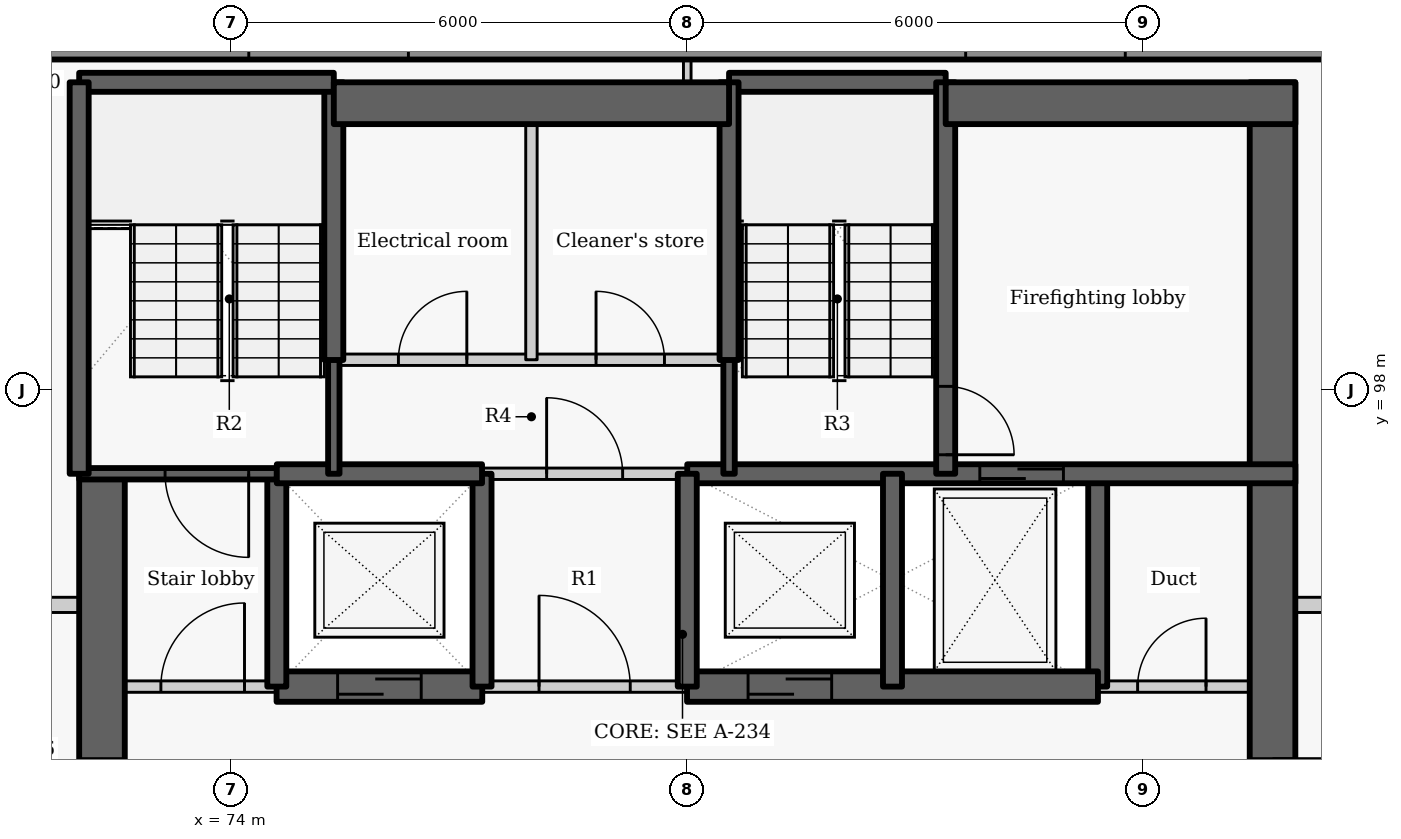
"""IFC4 building model, lengths in metres.
Left out: names, types, materials, properties, quantities, classifications, styles, units other than length and angle.
Written with IfcOpenShell. Run it as: python <this file> out.ifc"""

import sys

from ifc_helpers import new_model, si_unit, direction, frame, frame_2d, origin, place, context, subcontext, project, spatial, rectangle, extrude, element, fill, save


model = new_model("IFC4")
c1 = context("Model", 3, precision=1e-05, world=origin(), true_north=direction((0.0, 1.0)))
c2 = subcontext(c1, "Body", "Model", "MODEL_VIEW")
j1 = project(units=[si_unit("LENGTHUNIT", "METRE"), si_unit("PLANEANGLEUNIT", "RADIAN")], contexts=[c1])
p1 = place(None, origin())
s1 = spatial("IfcSite", under=j1, at=p1, CompositionType="ELEMENT")
p2 = place(p1, origin())
s2 = spatial("IfcBuilding", under=s1, at=p2, CompositionType="ELEMENT")
p3 = place(p2, frame((0.0, 0.0, 193.2)))
s3 = spatial("IfcBuildingStorey", under=s2, at=p3, CompositionType="ELEMENT", Elevation=193.2)
p4 = place(p3, frame((89.449, 102.5, 0.0), z_axis=(0.0, 0.0, 1.0), x_axis=(-1.0, 0.0, 0.0)))
e1 = element("IfcWall", 1, at=p4, inside=s3, PredefinedType="SOLIDWALL", context=c2, shape_type="SweptSolid", body=[
    extrude(rectangle(XDim=18.933, YDim=0.3, at=frame_2d((9.466, 0.0))), origin(), (0.0, 0.0, 1.0), 2.425),
])
p5 = place(p4, frame((3.687, 0.0, 0.9)))
e2 = element("IfcOpeningElement", 2, at=p5, cuts=e1, PredefinedType="OPENING", context=c2, shape_type="SweptSolid", body=[
    extrude(rectangle(XDim=2.1, YDim=1.1, at=frame_2d((1.05, 0.55))), frame((0.0, 0.16, 0.0), z_axis=(0.0, -1.0, 0.0), x_axis=(1.0, 0.0, 0.0)), (0.0, 0.0, 1.0), 0.32),
])
p6 = place(p4, frame((13.118, 0.0, 0.9)))
e3 = element("IfcOpeningElement", 3, at=p6, cuts=e1, PredefinedType="OPENING", context=c2, shape_type="SweptSolid", body=[
    extrude(rectangle(XDim=2.1, YDim=1.1, at=frame_2d((1.05, 0.55))), frame((0.0, 0.16, 0.0), z_axis=(0.0, -1.0, 0.0), x_axis=(1.0, 0.0, 0.0)), (0.0, 0.0, 1.0), 0.32),
])
p7 = place(p3, frame((72.3, 87.8, -0.275), z_axis=(0.0, 0.0, 1.0), x_axis=(0.0, 1.0, 0.0)))
e4 = element("IfcWall", 4, at=p7, inside=s3, PredefinedType="SHEAR", context=c2, shape_type="SweptSolid", body=[
    extrude(rectangle(XDim=9.1, YDim=0.6, at=frame_2d((4.55, 0.0))), origin(), (0.0, 0.0, 1.0), 3.3),
])
p8 = place(p7, frame((3.852, 0.0, 0.275)))
e5 = element("IfcOpeningElement", 5, at=p8, cuts=e4, PredefinedType="OPENING", context=c2, shape_type="SweptSolid", body=[
    extrude(rectangle(XDim=1.5, YDim=2.1, at=frame_2d((0.75, 1.05))), frame((0.0, 0.31, 0.0), z_axis=(0.0, -1.0, 0.0), x_axis=(1.0, 0.0, 0.0)), (0.0, 0.0, 1.0), 0.62),
])
p9 = place(p3, frame((85.4, 94.1, -0.275), z_axis=(0.0, 0.0, 1.0), x_axis=(0.0, 1.0, 0.0)))
e6 = element("IfcWall", 6, at=p9, inside=s3, PredefinedType="SHEAR", context=c2, shape_type="SweptSolid", body=[
    extrude(rectangle(XDim=2.8, YDim=0.25, at=frame_2d((1.4, 0.0))), origin(), (0.0, 0.0, 1.0), 3.3),
])
p10 = place(p3, frame((87.7, 102.05, -0.275), z_axis=(0.0, 0.0, 1.0), x_axis=(0.0, -1.0, 0.0)))
e7 = element("IfcWall", 7, at=p10, inside=s3, PredefinedType="SHEAR", context=c2, shape_type="SweptSolid", body=[
    extrude(rectangle(XDim=14.25, YDim=0.6, at=frame_2d((7.125, 0.0))), origin(), (0.0, 0.0, 1.0), 3.3),
])
p11 = place(p10, frame((8.898, 0.0, 0.275)))
e8 = element("IfcOpeningElement", 8, at=p11, cuts=e7, PredefinedType="OPENING", context=c2, shape_type="SweptSolid", body=[
    extrude(rectangle(XDim=1.5, YDim=2.1, at=frame_2d((0.75, 1.05))), frame((0.0, 0.31, 0.0), z_axis=(0.0, -1.0, 0.0), x_axis=(1.0, 0.0, 0.0)), (0.0, 0.0, 1.0), 0.62),
])
p12 = place(p3, frame((72.0, 94.1, 0.0), z_axis=(0.0, 0.0, 1.0), x_axis=(1.0, 0.0, 0.0)))
e9 = element("IfcWall", 9, at=p12, inside=s3, PredefinedType="PARTITIONING", context=c2, shape_type="SweptSolid", body=[
    extrude(rectangle(XDim=2.603, YDim=0.15, at=frame_2d((1.302, 0.0))), origin(), (0.0, 0.0, 1.0), 3.025),
])
p13 = place(p12, frame((1.075, 0.0, 0.0)))
e10 = element("IfcOpeningElement", 10, at=p13, cuts=e9, PredefinedType="OPENING", context=c2, shape_type="SweptSolid", body=[
    extrude(rectangle(XDim=1.1, YDim=2.1, at=frame_2d((0.55, 1.05))), frame((0.0, 0.085, 0.0), z_axis=(0.0, -1.0, 0.0), x_axis=(1.0, 0.0, 0.0)), (0.0, 0.0, 1.0), 0.17),
])
p14 = place(p3, frame((77.297, 94.1, 0.0), z_axis=(0.0, 0.0, 1.0), x_axis=(1.0, 0.0, 0.0)))
e11 = element("IfcWall", 11, at=p14, inside=s3, PredefinedType="PARTITIONING", context=c2, shape_type="SweptSolid", body=[
    extrude(rectangle(XDim=2.706, YDim=0.15, at=frame_2d((1.353, 0.0))), origin(), (0.0, 0.0, 1.0), 3.025),
])
p15 = place(p14, frame((0.753, 0.0, 0.0)))
e12 = element("IfcOpeningElement", 12, at=p15, cuts=e11, PredefinedType="OPENING", context=c2, shape_type="SweptSolid", body=[
    extrude(rectangle(XDim=1.2, YDim=2.1, at=frame_2d((0.6, 1.05))), frame((0.0, 0.085, 0.0), z_axis=(0.0, -1.0, 0.0), x_axis=(1.0, 0.0, 0.0)), (0.0, 0.0, 1.0), 0.17),
])
p16 = place(p3, frame((85.397, 94.1, 0.0), z_axis=(0.0, 0.0, 1.0), x_axis=(1.0, 0.0, 0.0)))
e13 = element("IfcWall", 13, at=p16, inside=s3, PredefinedType="PARTITIONING", context=c2, shape_type="SweptSolid", body=[
    extrude(rectangle(XDim=2.603, YDim=0.15, at=frame_2d((1.302, 0.0))), origin(), (0.0, 0.0, 1.0), 3.025),
])
p17 = place(p16, frame((0.528, 0.0, 0.0)))
e14 = element("IfcOpeningElement", 14, at=p17, cuts=e13, PredefinedType="OPENING", context=c2, shape_type="SweptSolid", body=[
    extrude(rectangle(XDim=0.9, YDim=2.1, at=frame_2d((0.45, 1.05))), frame((0.0, 0.085, 0.0), z_axis=(0.0, -1.0, 0.0), x_axis=(1.0, 0.0, 0.0)), (0.0, 0.0, 1.0), 0.17),
])
p18 = place(p3, frame((74.597, 94.1, -0.275), z_axis=(0.0, 0.0, 1.0), x_axis=(1.0, 0.0, 0.0)))
e15 = element("IfcWall", 15, at=p18, inside=s3, PredefinedType="SHEAR", context=c2, shape_type="SweptSolid", body=[
    extrude(rectangle(XDim=2.706, YDim=0.4, at=frame_2d((1.353, 0.0))), origin(), (0.0, 0.0, 1.0), 3.3),
])
p19 = place(p18, frame((0.803, 0.0, 0.275)))
e16 = element("IfcOpeningElement", 16, at=p19, cuts=e15, PredefinedType="OPENING", context=c2, shape_type="SweptSolid", body=[
    extrude(rectangle(XDim=1.1, YDim=2.1, at=frame_2d((0.55, 1.05))), frame((0.0, 0.21, 0.0), z_axis=(0.0, -1.0, 0.0), x_axis=(1.0, 0.0, 0.0)), (0.0, 0.0, 1.0), 0.42),
])
p20 = place(p3, frame((79.997, 94.1, -0.275), z_axis=(0.0, 0.0, 1.0), x_axis=(1.0, 0.0, 0.0)))
e17 = element("IfcWall", 17, at=p20, inside=s3, PredefinedType="SHEAR", context=c2, shape_type="SweptSolid", body=[
    extrude(rectangle(XDim=5.406, YDim=0.4, at=frame_2d((2.703, 0.0))), origin(), (0.0, 0.0, 1.0), 3.3),
])
p21 = place(p20, frame((0.803, 0.0, 0.275)))
e18 = element("IfcOpeningElement", 18, at=p21, cuts=e17, PredefinedType="OPENING", context=c2, shape_type="SweptSolid", body=[
    extrude(rectangle(XDim=1.1, YDim=2.1, at=frame_2d((0.55, 1.05))), frame((0.0, 0.21, 0.0), z_axis=(0.0, -1.0, 0.0), x_axis=(1.0, 0.0, 0.0)), (0.0, 0.0, 1.0), 0.42),
])
p22 = place(p3, frame((74.6, 94.1, -0.275), z_axis=(0.0, 0.0, 1.0), x_axis=(0.0, 1.0, 0.0)))
e19 = element("IfcWall", 19, at=p22, inside=s3, PredefinedType="SHEAR", context=c2, shape_type="SweptSolid", body=[
    extrude(rectangle(XDim=2.8, YDim=0.25, at=frame_2d((1.4, 0.0))), origin(), (0.0, 0.0, 1.0), 3.3),
])
p23 = place(p3, frame((74.6, 96.9, -0.275), z_axis=(0.0, 0.0, 1.0), x_axis=(-1.0, 0.0, 0.0)))
e20 = element("IfcWall", 20, at=p23, inside=s3, PredefinedType="SHEAR", context=c2, shape_type="SweptSolid", body=[
    extrude(rectangle(XDim=2.6, YDim=0.15, at=frame_2d((1.3, 0.0))), origin(), (0.0, 0.0, 1.0), 3.3),
])
p24 = place(p23, frame((0.37, 0.0, 0.275)))
e21 = element("IfcOpeningElement", 21, at=p24, cuts=e20, PredefinedType="OPENING", context=c2, shape_type="SweptSolid", body=[
    extrude(rectangle(XDim=1.1, YDim=2.1, at=frame_2d((0.55, 1.05))), frame((0.0, 0.085, 0.0), z_axis=(0.0, -1.0, 0.0), x_axis=(1.0, 0.0, 0.0)), (0.0, 0.0, 1.0), 0.17),
])
p25 = place(p3, frame((77.3, 94.1, -0.275), z_axis=(0.0, 0.0, 1.0), x_axis=(0.0, 1.0, 0.0)))
e22 = element("IfcWall", 22, at=p25, inside=s3, PredefinedType="SHEAR", context=c2, shape_type="SweptSolid", body=[
    extrude(rectangle(XDim=2.8, YDim=0.25, at=frame_2d((1.4, 0.0))), origin(), (0.0, 0.0, 1.0), 3.3),
])
p26 = place(p3, frame((74.6, 96.9, -0.275), z_axis=(0.0, 0.0, 1.0), x_axis=(1.0, 0.0, 0.0)))
e23 = element("IfcWall", 23, at=p26, inside=s3, PredefinedType="SHEAR", context=c2, shape_type="SweptSolid", body=[
    extrude(rectangle(XDim=2.7, YDim=0.25, at=frame_2d((1.35, 0.0))), origin(), (0.0, 0.0, 1.0), 3.3),
])
p27 = place(p3, frame((80.0, 96.9, -0.275), z_axis=(0.0, 0.0, 1.0), x_axis=(1.0, 0.0, 0.0)))
e24 = element("IfcWall", 24, at=p27, inside=s3, PredefinedType="SHEAR", context=c2, shape_type="SweptSolid", body=[
    extrude(rectangle(XDim=8.0, YDim=0.25, at=frame_2d((4.0, 0.0))), origin(), (0.0, 0.0, 1.0), 3.3),
])
p28 = place(p27, frame((3.849, 0.0, 0.275)))
e25 = element("IfcOpeningElement", 25, at=p28, cuts=e24, PredefinedType="OPENING", context=c2, shape_type="SweptSolid", body=[
    extrude(rectangle(XDim=1.1, YDim=2.1, at=frame_2d((0.55, 1.05))), frame((0.0, 0.135, 0.0), z_axis=(0.0, -1.0, 0.0), x_axis=(1.0, 0.0, 0.0)), (0.0, 0.0, 1.0), 0.27),
])
p29 = place(p3, frame((80.0, 94.1, -0.275), z_axis=(0.0, 0.0, 1.0), x_axis=(0.0, 1.0, 0.0)))
e26 = element("IfcWall", 26, at=p29, inside=s3, PredefinedType="SHEAR", context=c2, shape_type="SweptSolid", body=[
    extrude(rectangle(XDim=2.8, YDim=0.25, at=frame_2d((1.4, 0.0))), origin(), (0.0, 0.0, 1.0), 3.3),
])
p30 = place(p3, frame((77.3, 96.9, 0.0), z_axis=(0.0, 0.0, 1.0), x_axis=(1.0, 0.0, 0.0)))
e27 = element("IfcWall", 27, at=p30, inside=s3, PredefinedType="PARTITIONING", context=c2, shape_type="SweptSolid", body=[
    extrude(rectangle(XDim=2.7, YDim=0.15, at=frame_2d((1.35, 0.0))), origin(), (0.0, 0.0, 1.0), 3.025),
])
p31 = place(p30, frame((0.85, 0.0, 0.0)))
e28 = element("IfcOpeningElement", 28, at=p31, cuts=e27, PredefinedType="OPENING", context=c2, shape_type="SweptSolid", body=[
    extrude(rectangle(XDim=1.0, YDim=2.1, at=frame_2d((0.5, 1.05))), frame((0.0, 0.085, 0.0), z_axis=(0.0, -1.0, 0.0), x_axis=(1.0, 0.0, 0.0)), (0.0, 0.0, 1.0), 0.17),
])
p32 = place(p3, frame((82.7, 94.1, -0.275), z_axis=(0.0, 0.0, 1.0), x_axis=(0.0, 1.0, 0.0)))
e29 = element("IfcWall", 29, at=p32, inside=s3, PredefinedType="SHEAR", context=c2, shape_type="SweptSolid", body=[
    extrude(rectangle(XDim=2.8, YDim=0.25, at=frame_2d((1.4, 0.0))), origin(), (0.0, 0.0, 1.0), 3.3),
])
p33 = place(p3, frame((75.35, 96.9, -0.275), z_axis=(0.0, 0.0, 1.0), x_axis=(0.0, 1.0, 0.0)))
e30 = element("IfcWall", 30, at=p33, inside=s3, PredefinedType="SHEAR", context=c2, shape_type="SweptSolid", body=[
    extrude(rectangle(XDim=1.503, YDim=0.15, at=frame_2d((0.751, 0.0))), origin(), (0.0, 0.0, 1.0), 3.3),
])
p34 = place(p3, frame((75.35, 98.397, -0.275), z_axis=(0.0, 0.0, 1.0), x_axis=(0.0, 1.0, 0.0)))
e31 = element("IfcWall", 31, at=p34, inside=s3, PredefinedType="SHEAR", context=c2, shape_type="SweptSolid", body=[
    extrude(rectangle(XDim=3.653, YDim=0.25, at=frame_2d((1.827, 0.0))), origin(), (0.0, 0.0, 1.0), 3.3),
])
p35 = place(p3, frame((72.0, 102.05, -0.275), z_axis=(0.0, 0.0, 1.0), x_axis=(1.0, 0.0, 0.0)))
e32 = element("IfcWall", 32, at=p35, inside=s3, PredefinedType="SHEAR", context=c2, shape_type="SweptSolid", body=[
    extrude(rectangle(XDim=3.35, YDim=0.25, at=frame_2d((1.675, 0.0))), origin(), (0.0, 0.0, 1.0), 3.3),
])
p36 = place(p3, frame((80.55, 102.05, -0.275), z_axis=(0.0, 0.0, 1.0), x_axis=(1.0, 0.0, 0.0)))
e33 = element("IfcWall", 33, at=p36, inside=s3, PredefinedType="SHEAR", context=c2, shape_type="SweptSolid", body=[
    extrude(rectangle(XDim=2.85, YDim=0.25, at=frame_2d((1.425, 0.0))), origin(), (0.0, 0.0, 1.0), 3.3),
])
p37 = place(p3, frame((72.0, 96.9, -0.275), z_axis=(0.0, 0.0, 1.0), x_axis=(0.0, 1.0, 0.0)))
e34 = element("IfcWall", 34, at=p37, inside=s3, PredefinedType="SHEAR", context=c2, shape_type="SweptSolid", body=[
    extrude(rectangle(XDim=5.15, YDim=0.25, at=frame_2d((2.575, 0.0))), origin(), (0.0, 0.0, 1.0), 3.3),
])
p38 = place(p3, frame((83.4, 102.05, -0.275), z_axis=(0.0, 0.0, 1.0), x_axis=(0.0, -1.0, 0.0)))
e35 = element("IfcWall", 35, at=p38, inside=s3, PredefinedType="SHEAR", context=c2, shape_type="SweptSolid", body=[
    extrude(rectangle(XDim=5.15, YDim=0.25, at=frame_2d((2.575, 0.0))), origin(), (0.0, 0.0, 1.0), 3.3),
])
p39 = place(p38, frame((4.0, 0.0, 0.275)))
e36 = element("IfcOpeningElement", 36, at=p39, cuts=e35, PredefinedType="OPENING", context=c2, shape_type="SweptSolid", body=[
    extrude(rectangle(XDim=0.9, YDim=2.1, at=frame_2d((0.45, 1.05))), frame((0.0, 0.135, 0.0), z_axis=(0.0, -1.0, 0.0), x_axis=(1.0, 0.0, 0.0)), (0.0, 0.0, 1.0), 0.27),
])
p40 = place(p3, frame((80.55, 96.9, -0.275), z_axis=(0.0, 0.0, 1.0), x_axis=(0.0, 1.0, 0.0)))
e37 = element("IfcWall", 37, at=p40, inside=s3, PredefinedType="SHEAR", context=c2, shape_type="SweptSolid", body=[
    extrude(rectangle(XDim=1.503, YDim=0.15, at=frame_2d((0.751, 0.0))), origin(), (0.0, 0.0, 1.0), 3.3),
])
p41 = place(p3, frame((80.55, 98.397, -0.275), z_axis=(0.0, 0.0, 1.0), x_axis=(0.0, 1.0, 0.0)))
e38 = element("IfcWall", 38, at=p41, inside=s3, PredefinedType="SHEAR", context=c2, shape_type="SweptSolid", body=[
    extrude(rectangle(XDim=3.653, YDim=0.25, at=frame_2d((1.827, 0.0))), origin(), (0.0, 0.0, 1.0), 3.3),
])
p42 = place(p3, frame((75.35, 101.775, -0.275), z_axis=(0.0, 0.0, 1.0), x_axis=(1.0, 0.0, 0.0)))
e39 = element("IfcWall", 39, at=p42, inside=s3, PredefinedType="SHEAR", context=c2, shape_type="SweptSolid", body=[
    extrude(rectangle(XDim=5.2, YDim=0.55, at=frame_2d((2.6, 0.0))), origin(), (0.0, 0.0, 1.0), 3.3),
])
p43 = place(p3, frame((83.4, 101.775, -0.275), z_axis=(0.0, 0.0, 1.0), x_axis=(1.0, 0.0, 0.0)))
e40 = element("IfcWall", 40, at=p43, inside=s3, PredefinedType="SHEAR", context=c2, shape_type="SweptSolid", body=[
    extrude(rectangle(XDim=4.6, YDim=0.55, at=frame_2d((2.3, 0.0))), origin(), (0.0, 0.0, 1.0), 3.3),
])
p44 = place(p3, frame((75.35, 98.4, 0.0), z_axis=(0.0, 0.0, 1.0), x_axis=(1.0, 0.0, 0.0)))
e41 = element("IfcWall", 41, at=p44, inside=s3, PredefinedType="PARTITIONING", context=c2, shape_type="SweptSolid", body=[
    extrude(rectangle(XDim=5.2, YDim=0.15, at=frame_2d((2.6, 0.0))), origin(), (0.0, 0.0, 1.0), 3.025),
])
p45 = place(p44, frame((0.85, 0.0, 0.0)))
e42 = element("IfcOpeningElement", 42, at=p45, cuts=e41, PredefinedType="OPENING", context=c2, shape_type="SweptSolid", body=[
    extrude(rectangle(XDim=0.9, YDim=2.1, at=frame_2d((0.45, 1.05))), frame((0.0, 0.085, 0.0), z_axis=(0.0, -1.0, 0.0), x_axis=(1.0, 0.0, 0.0)), (0.0, 0.0, 1.0), 0.17),
])
p46 = place(p44, frame((3.45, 0.0, 0.0)))
e43 = element("IfcOpeningElement", 43, at=p46, cuts=e41, PredefinedType="OPENING", context=c2, shape_type="SweptSolid", body=[
    extrude(rectangle(XDim=0.9, YDim=2.1, at=frame_2d((0.45, 1.05))), frame((0.0, 0.085, 0.0), z_axis=(0.0, -1.0, 0.0), x_axis=(1.0, 0.0, 0.0)), (0.0, 0.0, 1.0), 0.17),
])
p47 = place(p3, frame((77.95, 98.4, 0.0), z_axis=(0.0, 0.0, 1.0), x_axis=(0.0, 1.0, 0.0)))
e44 = element("IfcWall", 44, at=p47, inside=s3, PredefinedType="PARTITIONING", context=c2, shape_type="SweptSolid", body=[
    extrude(rectangle(XDim=3.65, YDim=0.15, at=frame_2d((1.825, 0.0))), origin(), (0.0, 0.0, 1.0), 3.025),
])
p48 = place(p3, frame((69.587, 95.175, 0.0), z_axis=(0.0, 0.0, 1.0), x_axis=(1.0, 0.0, 0.0)))
e45 = element("IfcWall", 45, at=p48, inside=s3, PredefinedType="PARTITIONING", context=c2, shape_type="SweptSolid", body=[
    extrude(rectangle(XDim=2.413, YDim=0.2, at=frame_2d((1.207, 0.0))), origin(), (0.0, 0.0, 1.0), 2.505),
])
p49 = place(p3, frame((88.0, 95.175, 0.0), z_axis=(0.0, 0.0, 1.0), x_axis=(1.0, 0.0, 0.0)))
e46 = element("IfcWall", 46, at=p49, inside=s3, PredefinedType="PARTITIONING", context=c2, shape_type="SweptSolid", body=[
    extrude(rectangle(XDim=1.473, YDim=0.2, at=frame_2d((0.736, 0.0))), origin(), (0.0, 0.0, 1.0), 3.025),
])
p50 = place(p3, frame((80.0, 102.05, 0.0), z_axis=(0.0, 0.0, 1.0), x_axis=(0.0, 1.0, 0.0)))
e47 = element("IfcWall", 47, at=p50, inside=s3, PredefinedType="PARTITIONING", context=c2, shape_type="SweptSolid", body=[
    extrude(rectangle(XDim=0.3, YDim=0.1, at=frame_2d((0.15, 0.0))), origin(), (0.0, 0.0, 1.0), 3.025),
])
p51 = place(p13, origin())
e48 = element("IfcDoor", 48, at=p51, inside=s3, OperationType="SINGLE_SWING_RIGHT", PredefinedType="DOOR", context=c2, shape_type="SweptSolid", body=[
    extrude(rectangle(XDim=1.1, YDim=2.1, at=frame_2d((0.55, 1.05))), frame((0.0, 0.025, 0.0), z_axis=(0.0, -1.0, 0.0), x_axis=(1.0, 0.0, 0.0)), (0.0, 0.0, 1.0), 0.05),
])
fill(e10, e48)
p52 = place(p19, origin())
e49 = element("IfcDoor", 49, at=p52, inside=s3, OperationType="SLIDING_TO_LEFT", PredefinedType="DOOR", context=c2, shape_type="SweptSolid", body=[
    extrude(rectangle(XDim=1.1, YDim=2.1, at=frame_2d((0.55, 1.05))), frame((0.0, 0.025, 0.0), z_axis=(0.0, -1.0, 0.0), x_axis=(1.0, 0.0, 0.0)), (0.0, 0.0, 1.0), 0.05),
])
fill(e16, e49)
p53 = place(p15, origin())
e50 = element("IfcDoor", 50, at=p53, inside=s3, OperationType="DOUBLE_DOOR_SINGLE_SWING", PredefinedType="DOOR", context=c2, shape_type="SweptSolid", body=[
    extrude(rectangle(XDim=1.2, YDim=2.1, at=frame_2d((0.6, 1.05))), frame((0.0, 0.025, 0.0), z_axis=(0.0, -1.0, 0.0), x_axis=(1.0, 0.0, 0.0)), (0.0, 0.0, 1.0), 0.05),
])
fill(e12, e50)
p54 = place(p21, origin())
e51 = element("IfcDoor", 51, at=p54, inside=s3, OperationType="SLIDING_TO_LEFT", PredefinedType="DOOR", context=c2, shape_type="SweptSolid", body=[
    extrude(rectangle(XDim=1.1, YDim=2.1, at=frame_2d((0.55, 1.05))), frame((0.0, 0.025, 0.0), z_axis=(0.0, -1.0, 0.0), x_axis=(1.0, 0.0, 0.0)), (0.0, 0.0, 1.0), 0.05),
])
fill(e18, e51)
p55 = place(p28, origin())
e52 = element("IfcDoor", 52, at=p55, inside=s3, OperationType="SLIDING_TO_LEFT", PredefinedType="DOOR", context=c2, shape_type="SweptSolid", body=[
    extrude(rectangle(XDim=1.1, YDim=2.1, at=frame_2d((0.55, 1.05))), frame((0.0, 0.025, 0.0), z_axis=(0.0, -1.0, 0.0), x_axis=(1.0, 0.0, 0.0)), (0.0, 0.0, 1.0), 0.05),
])
fill(e25, e52)
p56 = place(p17, origin())
e53 = element("IfcDoor", 53, at=p56, inside=s3, OperationType="SINGLE_SWING_RIGHT", PredefinedType="DOOR", context=c2, shape_type="SweptSolid", body=[
    extrude(rectangle(XDim=0.9, YDim=2.1, at=frame_2d((0.45, 1.05))), frame((0.0, 0.025, 0.0), z_axis=(0.0, -1.0, 0.0), x_axis=(1.0, 0.0, 0.0)), (0.0, 0.0, 1.0), 0.05),
])
fill(e14, e53)
p57 = place(p31, origin())
e54 = element("IfcDoor", 54, at=p57, inside=s3, OperationType="SINGLE_SWING_LEFT", PredefinedType="DOOR", context=c2, shape_type="SweptSolid", body=[
    extrude(rectangle(XDim=1.0, YDim=2.1, at=frame_2d((0.5, 1.05))), frame((0.0, 0.025, 0.0), z_axis=(0.0, -1.0, 0.0), x_axis=(1.0, 0.0, 0.0)), (0.0, 0.0, 1.0), 0.05),
])
fill(e28, e54)
p58 = place(p45, origin())
e55 = element("IfcDoor", 55, at=p58, inside=s3, OperationType="SINGLE_SWING_RIGHT", PredefinedType="DOOR", context=c2, shape_type="SweptSolid", body=[
    extrude(rectangle(XDim=0.9, YDim=2.1, at=frame_2d((0.45, 1.05))), frame((0.0, 0.025, 0.0), z_axis=(0.0, -1.0, 0.0), x_axis=(1.0, 0.0, 0.0)), (0.0, 0.0, 1.0), 0.05),
])
fill(e42, e55)
p59 = place(p46, origin())
e56 = element("IfcDoor", 56, at=p59, inside=s3, OperationType="SINGLE_SWING_LEFT", PredefinedType="DOOR", context=c2, shape_type="SweptSolid", body=[
    extrude(rectangle(XDim=0.9, YDim=2.1, at=frame_2d((0.45, 1.05))), frame((0.0, 0.025, 0.0), z_axis=(0.0, -1.0, 0.0), x_axis=(1.0, 0.0, 0.0)), (0.0, 0.0, 1.0), 0.05),
])
fill(e43, e56)
p60 = place(p24, origin())
e57 = element("IfcDoor", 57, at=p60, inside=s3, OperationType="SINGLE_SWING_LEFT", PredefinedType="DOOR", context=c2, shape_type="SweptSolid", body=[
    extrude(rectangle(XDim=1.1, YDim=2.1, at=frame_2d((0.55, 1.05))), frame((0.0, 0.025, 0.0), z_axis=(0.0, -1.0, 0.0), x_axis=(1.0, 0.0, 0.0)), (0.0, 0.0, 1.0), 0.05),
])
fill(e21, e57)
p61 = place(p39, origin())
e58 = element("IfcDoor", 58, at=p61, inside=s3, OperationType="SINGLE_SWING_RIGHT", PredefinedType="DOOR", context=c2, shape_type="SweptSolid", body=[
    extrude(rectangle(XDim=0.9, YDim=2.1, at=frame_2d((0.45, 1.05))), frame((0.0, 0.025, 0.0), z_axis=(0.0, -1.0, 0.0), x_axis=(1.0, 0.0, 0.0)), (0.0, 0.0, 1.0), 0.05),
])
fill(e36, e58)
p62 = place(p11, origin())
e59 = element("IfcDoor", 59, at=p62, inside=s3, OperationType="DOUBLE_DOOR_SINGLE_SWING", PredefinedType="DOOR", context=c2, shape_type="SweptSolid", body=[
    extrude(rectangle(XDim=1.5, YDim=2.1, at=frame_2d((0.75, 1.05))), frame((0.0, 0.025, 0.0), z_axis=(0.0, -1.0, 0.0), x_axis=(1.0, 0.0, 0.0)), (0.0, 0.0, 1.0), 0.05),
])
fill(e8, e59)
p63 = place(p8, origin())
e60 = element("IfcDoor", 60, at=p63, inside=s3, OperationType="DOUBLE_DOOR_SINGLE_SWING", PredefinedType="DOOR", context=c2, shape_type="SweptSolid", body=[
    extrude(rectangle(XDim=1.5, YDim=2.1, at=frame_2d((0.75, 1.05))), frame((0.0, 0.025, 0.0), z_axis=(0.0, -1.0, 0.0), x_axis=(1.0, 0.0, 0.0)), (0.0, 0.0, 1.0), 0.05),
])
fill(e5, e60)
save(model, sys.argv[1])
